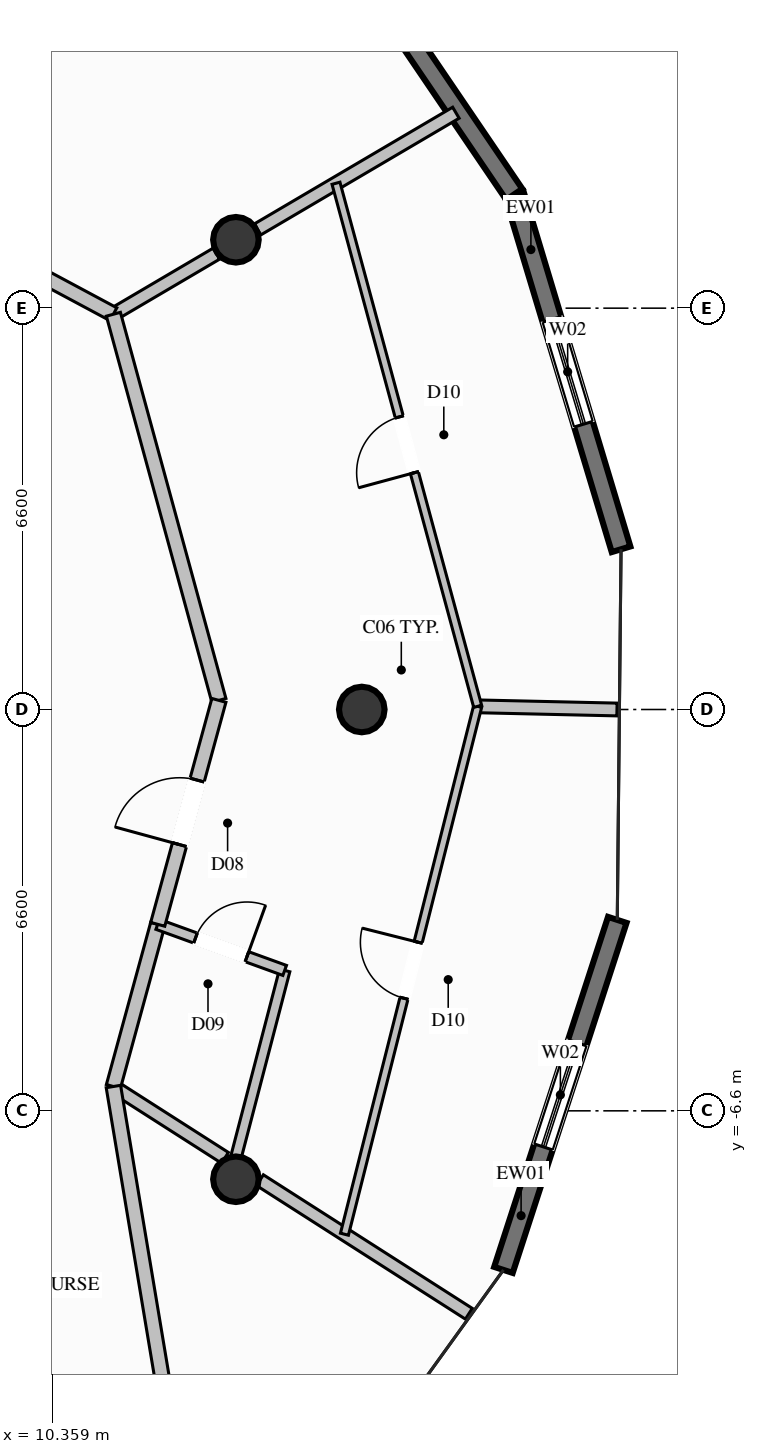
"""IFC4 building model, lengths in metres.
Left out: names, types, materials, properties, quantities, classifications, styles, units other than length and angle.
Written with IfcOpenShell. Run it as: python <this file> out.ifc"""

import sys

from ifc_helpers import new_model, si_unit, direction, frame, frame_2d, origin, origin_2d, place, context, subcontext, project, spatial, rectangle, circle, extrude, element, fill, save


model = new_model("IFC4")
c1 = context("Model", 3, precision=1e-05, world=origin(), true_north=direction((0.0, 1.0)))
c2 = subcontext(c1, "Body", "Model", "MODEL_VIEW")
j1 = project(units=[si_unit("LENGTHUNIT", "METRE"), si_unit("PLANEANGLEUNIT", "RADIAN")], contexts=[c1])
p1 = place(None, origin())
s1 = spatial("IfcSite", under=j1, at=p1, CompositionType="ELEMENT")
p2 = place(p1, origin())
s2 = spatial("IfcBuilding", under=s1, at=p2, CompositionType="ELEMENT")
p3 = place(p2, frame((0.0, 0.0, 254.4)))
s3 = spatial("IfcBuildingStorey", under=s2, at=p3, CompositionType="ELEMENT", Elevation=254.4)
for number, where, z_axis, x_axis in (
    (1, (15.45, 0.0, 0.0), (0.0, 0.0, 1.0), (1.0, 0.0, 0.0)),
    (2, (13.38, 7.725, 0.0), (0.0, 0.0, 1.0), (1.0, 0.0, 0.0)),
    (3, (13.38, -7.725, 0.0), (0.0, 0.0, 1.0), (1.0, 0.0, 0.0)),
):
    element("IfcColumn", number, at=place(p3, frame(where, z_axis=z_axis, x_axis=x_axis)), inside=s3, PredefinedType="COLUMN", context=c2, shape_type="SweptSolid", body=[
        extrude(circle(Radius=0.375, at=origin_2d()), origin(), (0.0, 0.0, 1.0), 3.8),
    ])
p4 = place(p3, frame((19.652, -3.46, 0.0), z_axis=(0.0, 0.0, 1.0), x_axis=(-0.30928580051, -0.950969133885, 0.0)))
e4 = element("IfcWall", 4, at=p4, inside=s3, PredefinedType="SOLIDWALL", context=c2, shape_type="SweptSolid", body=[
    extrude(rectangle(XDim=6.053, YDim=0.32, at=frame_2d((3.026, 0.0))), origin(), (0.0, 0.0, 1.0), 3.57),
])
p5 = place(p4, frame((2.126, 0.0, 0.35)))
e5 = element("IfcOpeningElement", 5, at=p5, cuts=e4, PredefinedType="OPENING", context=c2, shape_type="SweptSolid", body=[
    extrude(rectangle(XDim=1.8, YDim=2.6, at=frame_2d((0.9, 1.3))), frame((0.0, 0.17, 0.0), z_axis=(0.0, -1.0, 0.0), x_axis=(1.0, 0.0, 0.0)), (0.0, 0.0, 1.0), 0.34),
])
p6 = place(p3, frame((17.958, 8.472, 0.0), z_axis=(0.0, 0.0, 1.0), x_axis=(0.288104770088, -0.957598893824, 0.0)))
e6 = element("IfcWall", 6, at=p6, inside=s3, PredefinedType="SOLIDWALL", context=c2, shape_type="SweptSolid", body=[
    extrude(rectangle(XDim=6.095, YDim=0.32, at=frame_2d((3.048, 0.0))), origin(), (0.0, 0.0, 1.0), 3.57),
])
p7 = place(p6, frame((2.148, 0.0, 0.35)))
e7 = element("IfcOpeningElement", 7, at=p7, cuts=e6, PredefinedType="OPENING", context=c2, shape_type="SweptSolid", body=[
    extrude(rectangle(XDim=1.8, YDim=2.6, at=frame_2d((0.9, 1.3))), frame((0.0, 0.17, 0.0), z_axis=(0.0, -1.0, 0.0), x_axis=(1.0, 0.0, 0.0)), (0.0, 0.0, 1.0), 0.34),
])
p8 = place(p3, frame((14.557, 13.48, 0.0), z_axis=(0.0, 0.0, 1.0), x_axis=(0.561817948075, -0.827260897916, 0.0)))
e8 = element("IfcWall", 8, at=p8, inside=s3, PredefinedType="SOLIDWALL", context=c2, shape_type="SweptSolid", body=[
    extrude(rectangle(XDim=6.054, YDim=0.32, at=frame_2d((3.027, 0.0))), origin(), (0.0, 0.0, 1.0), 3.57),
])
p9 = place(p8, frame((1.252, 0.0, 0.35)))
e9 = element("IfcOpeningElement", 9, at=p9, cuts=e8, PredefinedType="OPENING", context=c2, shape_type="SweptSolid", body=[
    extrude(rectangle(XDim=1.8, YDim=2.6, at=frame_2d((0.9, 1.3))), frame((0.0, 0.17, 0.0), z_axis=(0.0, -1.0, 0.0), x_axis=(1.0, 0.0, 0.0)), (0.0, 0.0, 1.0), 0.34),
])
p10 = place(p3, frame((11.365, 6.5, 0.0), z_axis=(0.0, 0.0, 1.0), x_axis=(0.861902264102, 0.507074439443, 0.0)))
e10 = element("IfcWall", 10, at=p10, inside=s3, PredefinedType="PARTITIONING", context=c2, shape_type="SweptSolid", body=[
    extrude(rectangle(XDim=1.964, YDim=0.21, at=frame_2d((0.982, 0.0))), origin(), (0.0, 0.0, 1.0), 3.011),
])
p11 = place(p3, frame((13.736, 7.895, 0.0), z_axis=(0.0, 0.0, 1.0), x_axis=(0.861917631158, 0.507048318307, 0.0)))
e11 = element("IfcWall", 11, at=p11, inside=s3, PredefinedType="PARTITIONING", context=c2, shape_type="SweptSolid", body=[
    extrude(rectangle(XDim=3.784, YDim=0.21, at=frame_2d((1.892, 0.0))), origin(), (0.0, 0.0, 1.0), 3.57),
])
p12 = place(p3, frame((11.365, -6.2, 0.0), z_axis=(0.0, 0.0, 1.0), x_axis=(0.842537994554, -0.538636916422, 0.0)))
e12 = element("IfcWall", 12, at=p12, inside=s3, PredefinedType="PARTITIONING", context=c2, shape_type="SweptSolid", body=[
    extrude(rectangle(XDim=2.178, YDim=0.21, at=frame_2d((1.089, 0.0))), origin(), (0.0, 0.0, 1.0), 3.011),
])
p13 = place(p3, frame((13.775, -7.74, 0.0), z_axis=(0.0, 0.0, 1.0), x_axis=(0.842498543439, -0.538698621033, 0.0)))
e13 = element("IfcWall", 13, at=p13, inside=s3, PredefinedType="PARTITIONING", context=c2, shape_type="SweptSolid", body=[
    extrude(rectangle(XDim=4.078, YDim=0.21, at=frame_2d((2.039, 0.0))), origin(), (0.0, 0.0, 1.0), 3.57),
])
p14 = place(p3, frame((7.35, 8.65, 0.0), z_axis=(0.0, 0.0, 1.0), x_axis=(0.881565227264, -0.472062231151, 0.0)))
e14 = element("IfcWall", 14, at=p14, inside=s3, PredefinedType="PARTITIONING", context=c2, shape_type="SweptSolid", body=[
    extrude(rectangle(XDim=4.554, YDim=0.24, at=frame_2d((2.277, 0.0))), origin(), (0.0, 0.0, 1.0), 3.57),
])
p15 = place(p14, frame((1.777, 0.0, 0.0)))
e15 = element("IfcOpeningElement", 15, at=p15, cuts=e14, PredefinedType="OPENING", context=c2, shape_type="SweptSolid", body=[
    extrude(rectangle(XDim=1.0, YDim=2.2, at=frame_2d((0.5, 1.1))), frame((0.0, 0.13, 0.0), z_axis=(0.0, -1.0, 0.0), x_axis=(1.0, 0.0, 0.0)), (0.0, 0.0, 1.0), 0.26),
])
p16 = place(p3, frame((11.365, -6.2, 0.0), z_axis=(0.0, 0.0, 1.0), x_axis=(0.263670269996, 0.964612869871, 0.0)))
e16 = element("IfcWall", 16, at=p16, inside=s3, PredefinedType="PARTITIONING", context=c2, shape_type="SweptSolid", body=[
    extrude(rectangle(XDim=2.765, YDim=0.24, at=frame_2d((1.382, 0.0))), origin(), (0.0, 0.0, 1.0), 3.57),
])
p17 = place(p3, frame((13.353, -7.471, 0.0), z_axis=(0.0, 0.0, 1.0), x_axis=(0.252225310896, 0.967668534439, 0.0)))
e17 = element("IfcWall", 17, at=p17, inside=s3, PredefinedType="PLUMBINGWALL", context=c2, shape_type="SweptSolid", body=[
    extrude(rectangle(XDim=3.286, YDim=0.175, at=frame_2d((1.643, 0.0))), origin(), (0.0, 0.0, 1.0), 3.138),
])
p18 = place(p3, frame((12.094, -3.533, 0.0), z_axis=(0.0, 0.0, 1.0), x_axis=(0.93996338917, -0.341275295062, 0.0)))
e18 = element("IfcWall", 18, at=p18, inside=s3, PredefinedType="PLUMBINGWALL", context=c2, shape_type="SweptSolid", body=[
    extrude(rectangle(XDim=2.221, YDim=0.175, at=frame_2d((1.111, 0.0))), origin(), (0.0, 0.0, 1.0), 3.57),
])
p19 = place(p18, frame((0.661, 0.0, 0.0)))
e19 = element("IfcOpeningElement", 19, at=p19, cuts=e18, PredefinedType="OPENING", context=c2, shape_type="SweptSolid", body=[
    extrude(rectangle(XDim=0.9, YDim=2.1, at=frame_2d((0.45, 1.05))), frame((0.0, 0.098, 0.0), z_axis=(0.0, -1.0, 0.0), x_axis=(1.0, 0.0, 0.0)), (0.0, 0.0, 1.0), 0.195),
])
p20 = place(p3, frame((17.356, 0.052, 0.0), z_axis=(0.0, 0.0, 1.0), x_axis=(0.999742495135, -0.022692364819, 0.0)))
e20 = element("IfcWall", 20, at=p20, inside=s3, PredefinedType="PARTITIONING", context=c2, shape_type="SweptSolid", body=[
    extrude(rectangle(XDim=2.292, YDim=0.21, at=frame_2d((1.146, 0.0))), origin(), (0.0, 0.0, 1.0), 3.57),
])
p21 = place(p3, frame((13.1, 0.15, 0.0), z_axis=(0.0, 0.0, 1.0), x_axis=(-0.263578683342, 0.964637899778, 0.0)))
e21 = element("IfcWall", 21, at=p21, inside=s3, PredefinedType="PARTITIONING", context=c2, shape_type="SweptSolid", body=[
    extrude(rectangle(XDim=6.583, YDim=0.24, at=frame_2d((3.292, 0.0))), origin(), (0.0, 0.0, 1.0), 3.57),
])
p22 = place(p3, frame((12.094, -3.533, 0.0), z_axis=(0.0, 0.0, 1.0), x_axis=(0.263528615014, 0.964651579104, 0.0)))
e22 = element("IfcWall", 22, at=p22, inside=s3, PredefinedType="PARTITIONING", context=c2, shape_type="SweptSolid", body=[
    extrude(rectangle(XDim=3.818, YDim=0.24, at=frame_2d((1.909, 0.0))), origin(), (0.0, 0.0, 1.0), 3.57),
])
p23 = place(p22, frame((1.359, 0.0, 0.0)))
e23 = element("IfcOpeningElement", 23, at=p23, cuts=e22, PredefinedType="OPENING", context=c2, shape_type="SweptSolid", body=[
    extrude(rectangle(XDim=1.1, YDim=2.3, at=frame_2d((0.55, 1.15))), frame((0.0, 0.13, 0.0), z_axis=(0.0, -1.0, 0.0), x_axis=(1.0, 0.0, 0.0)), (0.0, 0.0, 1.0), 0.26),
])
p24 = place(p3, frame((15.165, -8.629, 0.0), z_axis=(0.0, 0.0, 1.0), x_axis=(0.244710102304, 0.969596290128, 0.0)))
e24 = element("IfcWall", 24, at=p24, inside=s3, PredefinedType="PARTITIONING", context=c2, shape_type="SweptSolid", body=[
    extrude(rectangle(XDim=8.953, YDim=0.135, at=frame_2d((4.477, 0.0))), origin(), (0.0, 0.0, 1.0), 3.57),
])
p25 = place(p24, frame((4.002, 0.0, 0.0)))
e25 = element("IfcOpeningElement", 25, at=p25, cuts=e24, PredefinedType="OPENING", context=c2, shape_type="SweptSolid", body=[
    extrude(rectangle(XDim=0.95, YDim=2.1, at=frame_2d((0.475, 1.05))), frame((0.0, 0.078, 0.0), z_axis=(0.0, -1.0, 0.0), x_axis=(1.0, 0.0, 0.0)), (0.0, 0.0, 1.0), 0.155),
])
p26 = place(p3, frame((17.356, 0.052, 0.0), z_axis=(0.0, 0.0, 1.0), x_axis=(-0.261452695661, 0.965216290751, 0.0)))
e26 = element("IfcWall", 26, at=p26, inside=s3, PredefinedType="PARTITIONING", context=c2, shape_type="SweptSolid", body=[
    extrude(rectangle(XDim=8.912, YDim=0.135, at=frame_2d((4.456, 0.0))), origin(), (0.0, 0.0, 1.0), 3.57),
])
p27 = place(p26, frame((3.981, 0.0, 0.0)))
e27 = element("IfcOpeningElement", 27, at=p27, cuts=e26, PredefinedType="OPENING", context=c2, shape_type="SweptSolid", body=[
    extrude(rectangle(XDim=0.95, YDim=2.1, at=frame_2d((0.475, 1.05))), frame((0.0, 0.078, 0.0), z_axis=(0.0, -1.0, 0.0), x_axis=(1.0, 0.0, 0.0)), (0.0, 0.0, 1.0), 0.155),
])
p28 = place(p3, frame((12.3, -11.8, 0.0), z_axis=(0.0, 0.0, 1.0), x_axis=(-0.164691848211, 0.986345068996, 0.0)))
e28 = element("IfcWall", 28, at=p28, inside=s3, PredefinedType="PARTITIONING", context=c2, shape_type="SweptSolid", body=[
    extrude(rectangle(XDim=5.678, YDim=0.24, at=frame_2d((2.839, 0.0))), origin(), (0.0, 0.0, 1.0), 3.57),
])
p29 = place(p5, origin())
e29 = element("IfcWindow", 29, at=p29, inside=s3, PartitioningType="SINGLE_PANEL", PredefinedType="WINDOW", context=c2, shape_type="SweptSolid", body=[
    extrude(rectangle(XDim=1.8, YDim=2.6, at=frame_2d((0.9, 1.3))), frame((0.0, 0.03, 0.0), z_axis=(0.0, -1.0, 0.0), x_axis=(1.0, 0.0, 0.0)), (0.0, 0.0, 1.0), 0.06),
])
fill(e5, e29)
p30 = place(p7, origin())
e30 = element("IfcWindow", 30, at=p30, inside=s3, PartitioningType="SINGLE_PANEL", PredefinedType="WINDOW", context=c2, shape_type="SweptSolid", body=[
    extrude(rectangle(XDim=1.8, YDim=2.6, at=frame_2d((0.9, 1.3))), frame((0.0, 0.03, 0.0), z_axis=(0.0, -1.0, 0.0), x_axis=(1.0, 0.0, 0.0)), (0.0, 0.0, 1.0), 0.06),
])
fill(e7, e30)
p31 = place(p19, origin())
e31 = element("IfcDoor", 31, at=p31, inside=s3, OperationType="SINGLE_SWING_RIGHT", PredefinedType="DOOR", context=c2, shape_type="SweptSolid", body=[
    extrude(rectangle(XDim=0.9, YDim=2.1, at=frame_2d((0.45, 1.05))), frame((0.0, 0.025, 0.0), z_axis=(0.0, -1.0, 0.0), x_axis=(1.0, 0.0, 0.0)), (0.0, 0.0, 1.0), 0.05),
])
fill(e19, e31)
p32 = place(p23, origin())
e32 = element("IfcDoor", 32, at=p32, inside=s3, OperationType="SINGLE_SWING_LEFT", PredefinedType="DOOR", context=c2, shape_type="SweptSolid", body=[
    extrude(rectangle(XDim=1.1, YDim=2.3, at=frame_2d((0.55, 1.15))), frame((0.0, 0.025, 0.0), z_axis=(0.0, -1.0, 0.0), x_axis=(1.0, 0.0, 0.0)), (0.0, 0.0, 1.0), 0.05),
])
fill(e23, e32)
p33 = place(p25, origin())
e33 = element("IfcDoor", 33, at=p33, inside=s3, OperationType="SINGLE_SWING_RIGHT", PredefinedType="DOOR", context=c2, shape_type="SweptSolid", body=[
    extrude(rectangle(XDim=0.95, YDim=2.1, at=frame_2d((0.475, 1.05))), frame((0.0, 0.025, 0.0), z_axis=(0.0, -1.0, 0.0), x_axis=(1.0, 0.0, 0.0)), (0.0, 0.0, 1.0), 0.05),
])
fill(e25, e33)
p34 = place(p27, origin())
e34 = element("IfcDoor", 34, at=p34, inside=s3, OperationType="SINGLE_SWING_LEFT", PredefinedType="DOOR", context=c2, shape_type="SweptSolid", body=[
    extrude(rectangle(XDim=0.95, YDim=2.1, at=frame_2d((0.475, 1.05))), frame((0.0, 0.025, 0.0), z_axis=(0.0, -1.0, 0.0), x_axis=(1.0, 0.0, 0.0)), (0.0, 0.0, 1.0), 0.05),
])
fill(e27, e34)
save(model, sys.argv[1])
